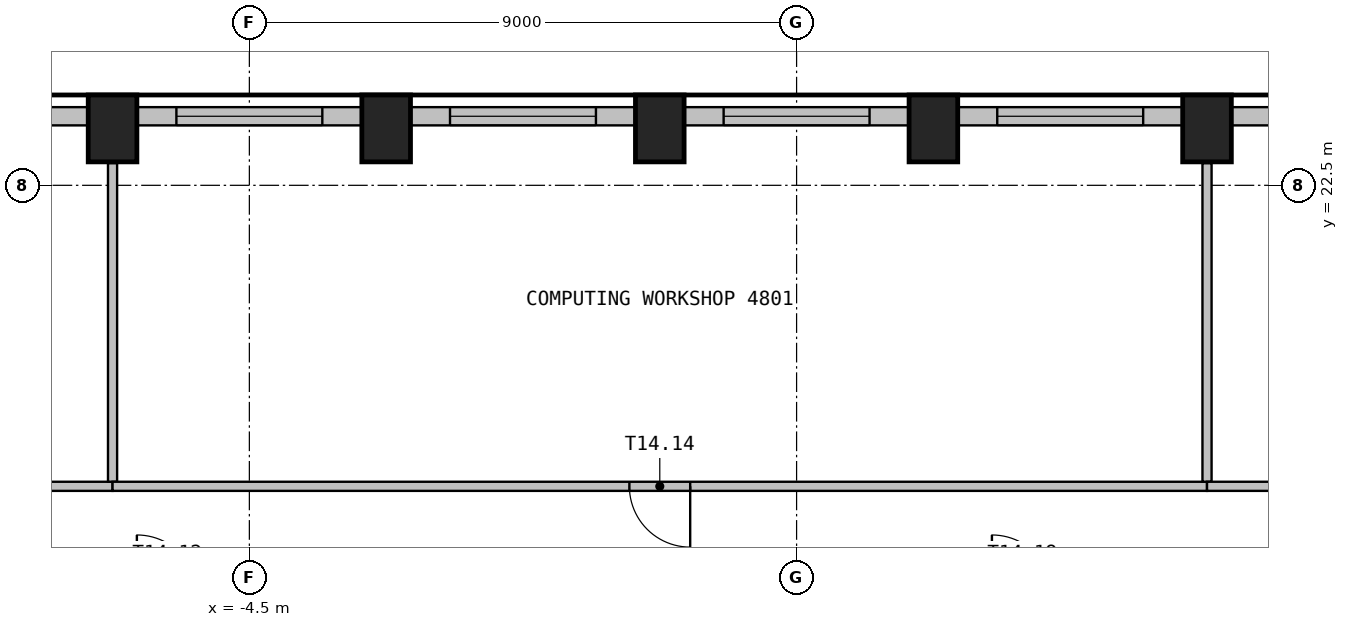
"""IFC4 building model, lengths in metres.
Left out: names, types, materials, properties, quantities, classifications, styles, units other than length and angle.
Written with IfcOpenShell. Run it as: python <this file> out.ifc"""

import sys

from ifc_helpers import new_model, si_unit, direction, frame, frame_2d, origin, origin_2d, place, context, subcontext, project, spatial, rectangle, extrude, element, fill, save


model = new_model("IFC4")
c1 = context("Model", 3, precision=1e-05, world=origin(), true_north=direction((0.0, 1.0)))
c2 = subcontext(c1, "Body", "Model", "MODEL_VIEW")
j1 = project(units=[si_unit("LENGTHUNIT", "METRE"), si_unit("PLANEANGLEUNIT", "RADIAN")], contexts=[c1])
p1 = place(None, origin())
s1 = spatial("IfcSite", under=j1, at=p1, CompositionType="ELEMENT")
p2 = place(p1, origin())
s2 = spatial("IfcBuilding", under=s1, at=p2, CompositionType="ELEMENT")
p3 = place(p2, frame((0.0, 0.0, 195.6)))
s3 = spatial("IfcBuildingStorey", under=s2, at=p3, CompositionType="ELEMENT", Elevation=195.6)
for number, where, z_axis, x_axis in (
    (1, (11.25, 23.436, 0.0), (0.0, 0.0, 1.0), (-1.0, 0.0, 0.0)),
    (2, (6.75, 23.436, 0.0), (0.0, 0.0, 1.0), (-1.0, 0.0, 0.0)),
    (3, (2.25, 23.436, 0.0), (0.0, 0.0, 1.0), (-1.0, 0.0, 0.0)),
    (4, (-2.25, 23.436, 0.0), (0.0, 0.0, 1.0), (-1.0, 0.0, 0.0)),
    (5, (-6.75, 23.436, 0.0), (0.0, 0.0, 1.0), (-1.0, 0.0, 0.0)),
):
    element("IfcColumn", number, at=place(p3, frame(where, z_axis=z_axis, x_axis=x_axis)), inside=s3, PredefinedType="COLUMN", context=c2, shape_type="SweptSolid", body=[
        extrude(rectangle(XDim=0.8, YDim=1.1, at=origin_2d()), origin(), (0.0, 0.0, 1.0), 3.55),
    ])
p4 = place(p3, frame((15.046, 23.635, 0.0), z_axis=(0.0, 0.0, 1.0), x_axis=(-1.0, 0.0, 0.0)))
e6 = element("IfcWall", 6, at=p4, inside=s3, PredefinedType="SOLIDWALL", context=c2, shape_type="SweptSolid", body=[
    extrude(rectangle(XDim=3.396, YDim=0.3, at=frame_2d((1.698, 0.0))), origin(), (0.0, 0.0, 1.0), 3.55),
])
p5 = place(p4, frame((0.346, 0.0, 0.9)))
e7 = element("IfcOpeningElement", 7, at=p5, cuts=e6, PredefinedType="OPENING", context=c2, shape_type="SweptSolid", body=[
    extrude(rectangle(XDim=2.4, YDim=2.1, at=frame_2d((1.2, 1.05))), frame((0.0, 0.16, 0.0), z_axis=(0.0, -1.0, 0.0), x_axis=(1.0, 0.0, 0.0)), (0.0, 0.0, 1.0), 0.32),
])
p6 = place(p3, frame((10.85, 23.635, 0.0), z_axis=(0.0, 0.0, 1.0), x_axis=(-1.0, 0.0, 0.0)))
e8 = element("IfcWall", 8, at=p6, inside=s3, PredefinedType="SOLIDWALL", context=c2, shape_type="SweptSolid", body=[
    extrude(rectangle(XDim=3.699, YDim=0.3, at=frame_2d((1.85, 0.0))), origin(), (0.0, 0.0, 1.0), 3.55),
])
p7 = place(p6, frame((0.649, 0.0, 0.9)))
e9 = element("IfcOpeningElement", 9, at=p7, cuts=e8, PredefinedType="OPENING", context=c2, shape_type="SweptSolid", body=[
    extrude(rectangle(XDim=2.4, YDim=2.1, at=frame_2d((1.2, 1.05))), frame((0.0, 0.16, 0.0), z_axis=(0.0, -1.0, 0.0), x_axis=(1.0, 0.0, 0.0)), (0.0, 0.0, 1.0), 0.32),
])
p8 = place(p3, frame((6.35, 23.635, 0.0), z_axis=(0.0, 0.0, 1.0), x_axis=(-1.0, 0.0, 0.0)))
e10 = element("IfcWall", 10, at=p8, inside=s3, PredefinedType="SOLIDWALL", context=c2, shape_type="SweptSolid", body=[
    extrude(rectangle(XDim=3.699, YDim=0.3, at=frame_2d((1.85, 0.0))), origin(), (0.0, 0.0, 1.0), 3.55),
])
p9 = place(p8, frame((0.649, 0.0, 0.9)))
e11 = element("IfcOpeningElement", 11, at=p9, cuts=e10, PredefinedType="OPENING", context=c2, shape_type="SweptSolid", body=[
    extrude(rectangle(XDim=2.4, YDim=2.1, at=frame_2d((1.2, 1.05))), frame((0.0, 0.16, 0.0), z_axis=(0.0, -1.0, 0.0), x_axis=(1.0, 0.0, 0.0)), (0.0, 0.0, 1.0), 0.32),
])
p10 = place(p3, frame((1.85, 23.635, 0.0), z_axis=(0.0, 0.0, 1.0), x_axis=(-1.0, 0.0, 0.0)))
e12 = element("IfcWall", 12, at=p10, inside=s3, PredefinedType="SOLIDWALL", context=c2, shape_type="SweptSolid", body=[
    extrude(rectangle(XDim=3.699, YDim=0.3, at=frame_2d((1.85, 0.0))), origin(), (0.0, 0.0, 1.0), 3.55),
])
p11 = place(p10, frame((0.649, 0.0, 0.9)))
e13 = element("IfcOpeningElement", 13, at=p11, cuts=e12, PredefinedType="OPENING", context=c2, shape_type="SweptSolid", body=[
    extrude(rectangle(XDim=2.4, YDim=2.1, at=frame_2d((1.2, 1.05))), frame((0.0, 0.16, 0.0), z_axis=(0.0, -1.0, 0.0), x_axis=(1.0, 0.0, 0.0)), (0.0, 0.0, 1.0), 0.32),
])
p12 = place(p3, frame((-2.65, 23.635, 0.0), z_axis=(0.0, 0.0, 1.0), x_axis=(-1.0, 0.0, 0.0)))
e14 = element("IfcWall", 14, at=p12, inside=s3, PredefinedType="SOLIDWALL", context=c2, shape_type="SweptSolid", body=[
    extrude(rectangle(XDim=3.699, YDim=0.3, at=frame_2d((1.85, 0.0))), origin(), (0.0, 0.0, 1.0), 3.55),
])
p13 = place(p12, frame((0.649, 0.0, 0.9)))
e15 = element("IfcOpeningElement", 15, at=p13, cuts=e14, PredefinedType="OPENING", context=c2, shape_type="SweptSolid", body=[
    extrude(rectangle(XDim=2.4, YDim=2.1, at=frame_2d((1.2, 1.05))), frame((0.0, 0.16, 0.0), z_axis=(0.0, -1.0, 0.0), x_axis=(1.0, 0.0, 0.0)), (0.0, 0.0, 1.0), 0.32),
])
p14 = place(p3, frame((-7.15, 23.635, 0.0), z_axis=(0.0, 0.0, 1.0), x_axis=(-1.0, 0.0, 0.0)))
e16 = element("IfcWall", 16, at=p14, inside=s3, PredefinedType="SOLIDWALL", context=c2, shape_type="SweptSolid", body=[
    extrude(rectangle(XDim=3.699, YDim=0.3, at=frame_2d((1.85, 0.0))), origin(), (0.0, 0.0, 1.0), 3.55),
])
p15 = place(p14, frame((0.649, 0.0, 0.9)))
e17 = element("IfcOpeningElement", 17, at=p15, cuts=e16, PredefinedType="OPENING", context=c2, shape_type="SweptSolid", body=[
    extrude(rectangle(XDim=2.4, YDim=2.1, at=frame_2d((1.2, 1.05))), frame((0.0, 0.16, 0.0), z_axis=(0.0, -1.0, 0.0), x_axis=(1.0, 0.0, 0.0)), (0.0, 0.0, 1.0), 0.32),
])
p16 = place(p3, frame((-6.75, 17.55, 0.0), z_axis=(0.0, 0.0, 1.0), x_axis=(-1.0, 0.0, 0.0)))
e18 = element("IfcWall", 18, at=p16, inside=s3, PredefinedType="PARTITIONING", context=c2, shape_type="SweptSolid", body=[
    extrude(rectangle(XDim=12.975, YDim=0.15, at=frame_2d((6.488, 0.0))), origin(), (0.0, 0.0, 1.0), 3.55),
])
p17 = place(p16, frame((5.988, 0.0, 0.0)))
e19 = element("IfcOpeningElement", 19, at=p17, cuts=e18, PredefinedType="OPENING", context=c2, shape_type="SweptSolid", body=[
    extrude(rectangle(XDim=1.0, YDim=2.1, at=frame_2d((0.5, 1.05))), frame((0.0, 0.085, 0.0), z_axis=(0.0, -1.0, 0.0), x_axis=(1.0, 0.0, 0.0)), (0.0, 0.0, 1.0), 0.17),
])
p18 = place(p3, frame((-6.75, 22.865, 0.0), z_axis=(0.0, 0.0, 1.0), x_axis=(0.0, -1.0, 0.0)))
e20 = element("IfcWall", 20, at=p18, inside=s3, PredefinedType="PARTITIONING", context=c2, shape_type="SweptSolid", body=[
    extrude(rectangle(XDim=5.24, YDim=0.15, at=frame_2d((2.62, 0.0))), origin(), (0.0, 0.0, 1.0), 3.55),
])
p19 = place(p3, frame((11.25, 17.55, 0.0), z_axis=(0.0, 0.0, 1.0), x_axis=(-1.0, 0.0, 0.0)))
e21 = element("IfcWall", 21, at=p19, inside=s3, PredefinedType="PARTITIONING", context=c2, shape_type="SweptSolid", body=[
    extrude(rectangle(XDim=18.0, YDim=0.15, at=frame_2d((9.0, 0.0))), origin(), (0.0, 0.0, 1.0), 3.55),
])
p20 = place(p19, frame((8.5, 0.0, 0.0)))
e22 = element("IfcOpeningElement", 22, at=p20, cuts=e21, PredefinedType="OPENING", context=c2, shape_type="SweptSolid", body=[
    extrude(rectangle(XDim=1.0, YDim=2.1, at=frame_2d((0.5, 1.05))), frame((0.0, 0.085, 0.0), z_axis=(0.0, -1.0, 0.0), x_axis=(1.0, 0.0, 0.0)), (0.0, 0.0, 1.0), 0.17),
])
p21 = place(p3, frame((11.25, 22.865, 0.0), z_axis=(0.0, 0.0, 1.0), x_axis=(0.0, -1.0, 0.0)))
e23 = element("IfcWall", 23, at=p21, inside=s3, PredefinedType="PARTITIONING", context=c2, shape_type="SweptSolid", body=[
    extrude(rectangle(XDim=5.24, YDim=0.15, at=frame_2d((2.62, 0.0))), origin(), (0.0, 0.0, 1.0), 3.55),
])
p22 = place(p3, frame((19.875, 17.55, 0.0), z_axis=(0.0, 0.0, 1.0), x_axis=(-1.0, 0.0, 0.0)))
e24 = element("IfcWall", 24, at=p22, inside=s3, PredefinedType="PARTITIONING", context=c2, shape_type="SweptSolid", body=[
    extrude(rectangle(XDim=8.625, YDim=0.15, at=frame_2d((4.312, 0.0))), origin(), (0.0, 0.0, 1.0), 3.55),
])
p23 = place(p22, frame((3.812, 0.0, 0.0)))
e25 = element("IfcOpeningElement", 25, at=p23, cuts=e24, PredefinedType="OPENING", context=c2, shape_type="SweptSolid", body=[
    extrude(rectangle(XDim=1.0, YDim=2.1, at=frame_2d((0.5, 1.05))), frame((0.0, 0.085, 0.0), z_axis=(0.0, -1.0, 0.0), x_axis=(1.0, 0.0, 0.0)), (0.0, 0.0, 1.0), 0.17),
])
p24 = place(p7, origin())
e26 = element("IfcWindow", 26, at=p24, inside=s3, PartitioningType="SINGLE_PANEL", PredefinedType="WINDOW", context=c2, shape_type="SweptSolid", body=[
    extrude(rectangle(XDim=2.4, YDim=2.1, at=frame_2d((1.2, 1.05))), frame((0.0, 0.03, 0.0), z_axis=(0.0, -1.0, 0.0), x_axis=(1.0, 0.0, 0.0)), (0.0, 0.0, 1.0), 0.06),
])
fill(e9, e26)
p25 = place(p9, origin())
e27 = element("IfcWindow", 27, at=p25, inside=s3, PartitioningType="SINGLE_PANEL", PredefinedType="WINDOW", context=c2, shape_type="SweptSolid", body=[
    extrude(rectangle(XDim=2.4, YDim=2.1, at=frame_2d((1.2, 1.05))), frame((0.0, 0.03, 0.0), z_axis=(0.0, -1.0, 0.0), x_axis=(1.0, 0.0, 0.0)), (0.0, 0.0, 1.0), 0.06),
])
fill(e11, e27)
p26 = place(p11, origin())
e28 = element("IfcWindow", 28, at=p26, inside=s3, PartitioningType="SINGLE_PANEL", PredefinedType="WINDOW", context=c2, shape_type="SweptSolid", body=[
    extrude(rectangle(XDim=2.4, YDim=2.1, at=frame_2d((1.2, 1.05))), frame((0.0, 0.03, 0.0), z_axis=(0.0, -1.0, 0.0), x_axis=(1.0, 0.0, 0.0)), (0.0, 0.0, 1.0), 0.06),
])
fill(e13, e28)
p27 = place(p13, origin())
e29 = element("IfcWindow", 29, at=p27, inside=s3, PartitioningType="SINGLE_PANEL", PredefinedType="WINDOW", context=c2, shape_type="SweptSolid", body=[
    extrude(rectangle(XDim=2.4, YDim=2.1, at=frame_2d((1.2, 1.05))), frame((0.0, 0.03, 0.0), z_axis=(0.0, -1.0, 0.0), x_axis=(1.0, 0.0, 0.0)), (0.0, 0.0, 1.0), 0.06),
])
fill(e15, e29)
p28 = place(p20, origin())
e30 = element("IfcDoor", 30, at=p28, inside=s3, OperationType="SINGLE_SWING_RIGHT", PredefinedType="DOOR", context=c2, shape_type="SweptSolid", body=[
    extrude(rectangle(XDim=1.0, YDim=2.1, at=frame_2d((0.5, 1.05))), frame((0.0, 0.025, 0.0), z_axis=(0.0, -1.0, 0.0), x_axis=(1.0, 0.0, 0.0)), (0.0, 0.0, 1.0), 0.05),
])
fill(e22, e30)
save(model, sys.argv[1])
